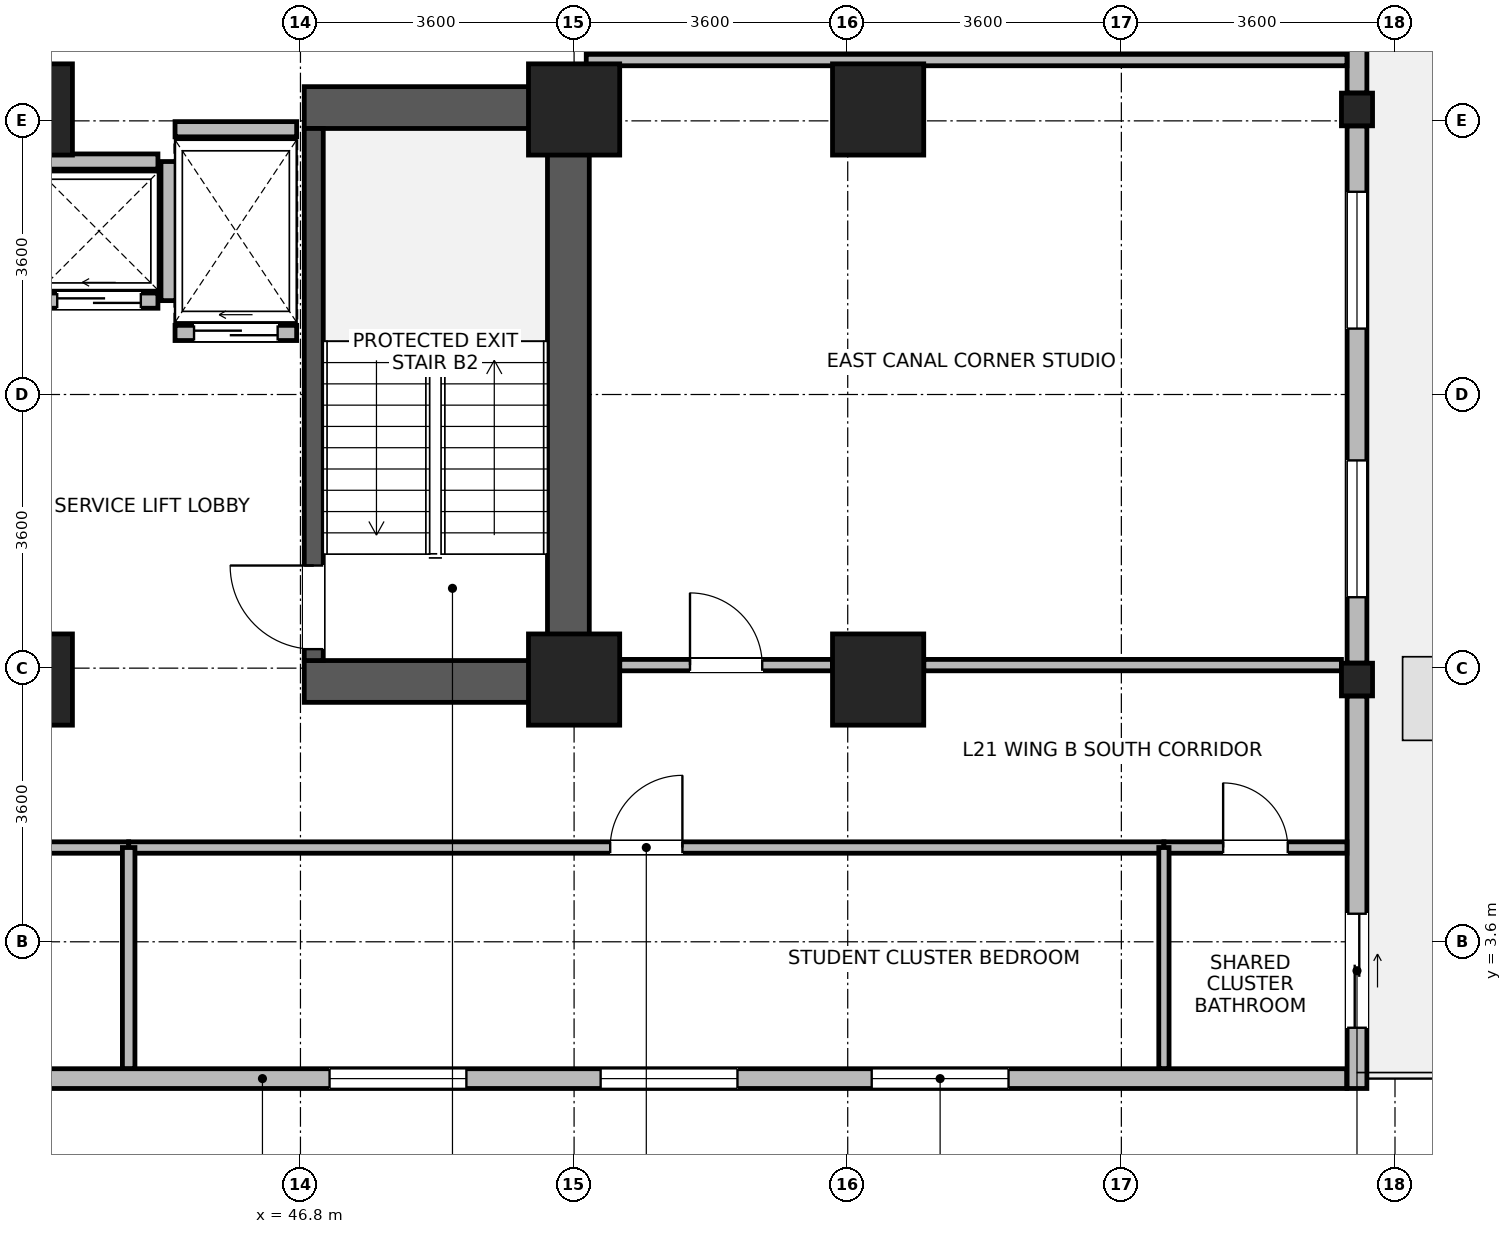
"""IFC4 building model, lengths in metres.
Left out: names, types, materials, properties, quantities, classifications, styles, units other than length and angle.
Written with IfcOpenShell. Run it as: python <this file> out.ifc"""

import sys

from ifc_helpers import new_model, si_unit, direction, frame, frame_2d, origin, origin_2d, place, context, subcontext, project, spatial, rectangle, i_section, extrude, source, transform, mapped, element, fill, save


model = new_model("IFC4")
c1 = context("Model", 3, precision=1e-05, world=origin(), true_north=direction((0.0, 1.0)))
c2 = subcontext(c1, "Body", "Model", "MODEL_VIEW")
j1 = project(units=[si_unit("LENGTHUNIT", "METRE"), si_unit("PLANEANGLEUNIT", "RADIAN")], contexts=[c1])
p1 = place(None, origin())
s1 = spatial("IfcSite", under=j1, at=p1, CompositionType="ELEMENT")
p2 = place(p1, origin())
s2 = spatial("IfcBuilding", under=s1, at=p2, CompositionType="ELEMENT")
p3 = place(p2, frame((0.0, 0.0, 86.0)))
s3 = spatial("IfcBuildingStorey", under=s2, at=p3, CompositionType="ELEMENT", Elevation=86.0)
p4 = place(p3, frame((50.325, 6.75, 0.0), z_axis=(0.0, 0.0, 1.0), x_axis=(0.0, 1.0, 0.0)))
e1 = element("IfcWall", 1, at=p4, inside=s3, PredefinedType="SHEAR", context=c2, shape_type="SweptSolid", body=[
    extrude(rectangle(XDim=8.1, YDim=0.55, at=frame_2d((4.05, 0.0))), origin(), (0.0, 0.0, 1.0), 3.45),
])
for number, where, z_axis, x_axis in (
    (2, (46.85, 7.025, 0.0), (0.0, 0.0, 1.0), (1.0, 0.0, 0.0)),
    (3, (46.85, 14.575, 0.0), (0.0, 0.0, 1.0), (1.0, 0.0, 0.0)),
):
    element("IfcWall", number, at=place(p3, frame(where, z_axis=z_axis, x_axis=x_axis)), inside=s3, PredefinedType="SHEAR", context=c2, shape_type="SweptSolid", body=[
        extrude(rectangle(XDim=3.2, YDim=0.55, at=frame_2d((1.6, 0.0))), origin(), (0.0, 0.0, 1.0), 3.45),
    ])
p5 = place(p3, frame((46.975, 7.3, 0.0), z_axis=(0.0, 0.0, 1.0), x_axis=(0.0, 1.0, 0.0)))
e4 = element("IfcWall", 4, at=p5, inside=s3, PredefinedType="SHEAR", context=c2, shape_type="SweptSolid", body=[
    extrude(rectangle(XDim=7.0, YDim=0.25, at=frame_2d((3.5, 0.0))), origin(), (0.0, 0.0, 1.0), 3.45),
])
p6 = place(p5, frame((0.15, 0.0, 0.0)))
e5 = element("IfcOpeningElement", 5, at=p6, cuts=e4, PredefinedType="OPENING", context=c2, shape_type="SweptSolid", body=[
    extrude(rectangle(XDim=1.1, YDim=2.08, at=frame_2d((0.55, 1.04))), frame((0.0, 0.135, 0.0), z_axis=(0.0, -1.0, 0.0), x_axis=(1.0, 0.0, 0.0)), (0.0, 0.0, 1.0), 0.27),
])
m1 = source(origin(), c2, "Body", "SweptSolid", [
    extrude(rectangle(XDim=1.2, YDim=1.2, at=origin_2d()), origin(), (0.0, 0.0, 1.0), 3.7),
])
for number, where, z_axis, x_axis in (
    (6, (43.2, 7.05, 0.0), (0.0, 0.0, 1.0), (1.0, 0.0, 0.0)),
    (7, (43.2, 14.55, 0.0), (0.0, 0.0, 1.0), (1.0, 0.0, 0.0)),
    (8, (50.4, 7.05, 0.0), (0.0, 0.0, 1.0), (1.0, 0.0, 0.0)),
    (9, (50.4, 14.55, 0.0), (0.0, 0.0, 1.0), (1.0, 0.0, 0.0)),
    (10, (54.4, 7.05, 0.0), (0.0, 0.0, 1.0), (1.0, 0.0, 0.0)),
    (11, (54.4, 14.55, 0.0), (0.0, 0.0, 1.0), (1.0, 0.0, 0.0)),
):
    element("IfcColumn", number, at=place(p3, frame(where, z_axis=z_axis, x_axis=x_axis)), inside=s3, PredefinedType="COLUMN", context=c2, shape_type="MappedRepresentation", body=[
        mapped(m1, transform((0.0, 0.0, 0.0), x_axis=(1.0, 0.0, 0.0), y_axis=(0.0, 1.0, 0.0), z_axis=(0.0, 0.0, 1.0), scale=1.0)),
    ])
m2 = source(origin(), c2, "Body", "SweptSolid", [
    extrude(i_section(OverallWidth=0.409, OverallDepth=0.43, WebThickness=0.024, FlangeThickness=0.033, FilletRadius=0.015, at=origin_2d()), origin(), (0.0, 0.0, 1.0), 3.7),
])
for number, where, z_axis, x_axis in (
    (12, (60.7, 7.05, 0.0), (0.0, 0.0, 1.0), (1.0, 0.0, 0.0)),
    (13, (60.7, 14.55, 0.0), (0.0, 0.0, 1.0), (1.0, 0.0, 0.0)),
):
    element("IfcColumn", number, at=place(p3, frame(where, z_axis=z_axis, x_axis=x_axis)), inside=s3, PredefinedType="COLUMN", context=c2, shape_type="MappedRepresentation", body=[
        mapped(m2, transform((0.0, 0.0, 0.0), x_axis=(1.0, 0.0, 0.0), y_axis=(0.0, 1.0, 0.0), z_axis=(0.0, 0.0, 1.0), scale=1.0)),
    ])
p7 = place(p3, frame((60.565, 1.8, 0.0), z_axis=(0.0, 0.0, 1.0), x_axis=(-1.0, 0.0, 0.0)))
e14 = element("IfcWall", 14, at=p7, inside=s3, PredefinedType="STANDARD", context=c2, shape_type="SweptSolid", body=[
    extrude(rectangle(XDim=28.53, YDim=0.26, at=frame_2d((14.265, 0.0))), origin(), (0.0, 0.0, 1.0), 3.43),
])
p8 = place(p7, frame((4.449, 0.0, 0.85)))
e15 = element("IfcOpeningElement", 15, at=p8, cuts=e14, PredefinedType="OPENING", context=c2, shape_type="SweptSolid", body=[
    extrude(rectangle(XDim=1.8, YDim=1.85, at=frame_2d((0.9, 0.925))), frame((0.0, 0.14, 0.0), z_axis=(0.0, -1.0, 0.0), x_axis=(1.0, 0.0, 0.0)), (0.0, 0.0, 1.0), 0.28),
])
p9 = place(p7, frame((8.016, 0.0, 0.85)))
e16 = element("IfcOpeningElement", 16, at=p9, cuts=e14, PredefinedType="OPENING", context=c2, shape_type="SweptSolid", body=[
    extrude(rectangle(XDim=1.8, YDim=1.85, at=frame_2d((0.9, 0.925))), frame((0.0, 0.14, 0.0), z_axis=(0.0, -1.0, 0.0), x_axis=(1.0, 0.0, 0.0)), (0.0, 0.0, 1.0), 0.28),
])
p10 = place(p7, frame((11.582, 0.0, 0.85)))
e17 = element("IfcOpeningElement", 17, at=p10, cuts=e14, PredefinedType="OPENING", context=c2, shape_type="SweptSolid", body=[
    extrude(rectangle(XDim=1.8, YDim=1.85, at=frame_2d((0.9, 0.925))), frame((0.0, 0.14, 0.0), z_axis=(0.0, -1.0, 0.0), x_axis=(1.0, 0.0, 0.0)), (0.0, 0.0, 1.0), 0.28),
])
p11 = place(p7, frame((18.714, 0.0, 0.85)))
e18 = element("IfcOpeningElement", 18, at=p11, cuts=e14, PredefinedType="OPENING", context=c2, shape_type="SweptSolid", body=[
    extrude(rectangle(XDim=1.8, YDim=1.85, at=frame_2d((0.9, 0.925))), frame((0.0, 0.14, 0.0), z_axis=(0.0, -1.0, 0.0), x_axis=(1.0, 0.0, 0.0)), (0.0, 0.0, 1.0), 0.28),
])
p12 = place(p7, frame((22.281, 0.0, 0.85)))
e19 = element("IfcOpeningElement", 19, at=p12, cuts=e14, PredefinedType="OPENING", context=c2, shape_type="SweptSolid", body=[
    extrude(rectangle(XDim=1.8, YDim=1.85, at=frame_2d((0.9, 0.925))), frame((0.0, 0.14, 0.0), z_axis=(0.0, -1.0, 0.0), x_axis=(1.0, 0.0, 0.0)), (0.0, 0.0, 1.0), 0.28),
])
p13 = place(p7, frame((25.847, 0.0, 0.85)))
e20 = element("IfcOpeningElement", 20, at=p13, cuts=e14, PredefinedType="OPENING", context=c2, shape_type="SweptSolid", body=[
    extrude(rectangle(XDim=1.8, YDim=1.85, at=frame_2d((0.9, 0.925))), frame((0.0, 0.14, 0.0), z_axis=(0.0, -1.0, 0.0), x_axis=(1.0, 0.0, 0.0)), (0.0, 0.0, 1.0), 0.28),
])
p14 = place(p3, frame((60.7, 6.834, 0.0), z_axis=(0.0, 0.0, 1.0), x_axis=(0.0, -1.0, 0.0)))
e21 = element("IfcWall", 21, at=p14, inside=s3, PredefinedType="STANDARD", context=c2, shape_type="SweptSolid", body=[
    extrude(rectangle(XDim=5.164, YDim=0.26, at=frame_2d((2.582, 0.0))), origin(), (0.0, 0.0, 1.0), 3.43),
])
p15 = place(p14, frame((2.865, 0.0, 0.0)))
e22 = element("IfcOpeningElement", 22, at=p15, cuts=e21, PredefinedType="OPENING", context=c2, shape_type="SweptSolid", body=[
    extrude(rectangle(XDim=1.5, YDim=2.15, at=frame_2d((0.75, 1.075))), frame((0.0, 0.14, 0.0), z_axis=(0.0, -1.0, 0.0), x_axis=(1.0, 0.0, 0.0)), (0.0, 0.0, 1.0), 0.28),
])
p16 = place(p3, frame((60.7, 14.334, 0.0), z_axis=(0.0, 0.0, 1.0), x_axis=(0.0, -1.0, 0.0)))
e23 = element("IfcWall", 23, at=p16, inside=s3, PredefinedType="STANDARD", context=c2, shape_type="SweptSolid", body=[
    extrude(rectangle(XDim=7.068, YDim=0.26, at=frame_2d((3.534, 0.0))), origin(), (0.0, 0.0, 1.0), 2.93),
])
p17 = place(p16, frame((0.867, 0.0, 0.85)))
e24 = element("IfcOpeningElement", 24, at=p17, cuts=e23, PredefinedType="OPENING", context=c2, shape_type="SweptSolid", body=[
    extrude(rectangle(XDim=1.8, YDim=1.85, at=frame_2d((0.9, 0.925))), frame((0.0, 0.14, 0.0), z_axis=(0.0, -1.0, 0.0), x_axis=(1.0, 0.0, 0.0)), (0.0, 0.0, 1.0), 0.28),
])
p18 = place(p16, frame((4.401, 0.0, 0.85)))
e25 = element("IfcOpeningElement", 25, at=p18, cuts=e23, PredefinedType="OPENING", context=c2, shape_type="SweptSolid", body=[
    extrude(rectangle(XDim=1.8, YDim=1.85, at=frame_2d((0.9, 0.925))), frame((0.0, 0.14, 0.0), z_axis=(0.0, -1.0, 0.0), x_axis=(1.0, 0.0, 0.0)), (0.0, 0.0, 1.0), 0.28),
])
p19 = place(p3, frame((60.7, 21.384, 0.0), z_axis=(0.0, 0.0, 1.0), x_axis=(0.0, -1.0, 0.0)))
e26 = element("IfcWall", 26, at=p19, inside=s3, PredefinedType="STANDARD", context=c2, shape_type="SweptSolid", body=[
    extrude(rectangle(XDim=6.618, YDim=0.26, at=frame_2d((3.309, 0.0))), origin(), (0.0, 0.0, 1.0), 2.93),
])
p20 = place(p19, frame((0.754, 0.0, 0.85)))
e27 = element("IfcOpeningElement", 27, at=p20, cuts=e26, PredefinedType="OPENING", context=c2, shape_type="SweptSolid", body=[
    extrude(rectangle(XDim=1.8, YDim=1.85, at=frame_2d((0.9, 0.925))), frame((0.0, 0.14, 0.0), z_axis=(0.0, -1.0, 0.0), x_axis=(1.0, 0.0, 0.0)), (0.0, 0.0, 1.0), 0.28),
])
p21 = place(p19, frame((4.687, 0.0, 0.85)))
e28 = element("IfcOpeningElement", 28, at=p21, cuts=e26, PredefinedType="OPENING", context=c2, shape_type="SweptSolid", body=[
    extrude(rectangle(XDim=0.95, YDim=1.75, at=frame_2d((0.475, 0.875))), frame((0.0, 0.14, 0.0), z_axis=(0.0, -1.0, 0.0), x_axis=(1.0, 0.0, 0.0)), (0.0, 0.0, 1.0), 0.28),
])
p22 = place(p3, frame((43.375, 12.035, 0.0), z_axis=(0.0, 0.0, 1.0), x_axis=(1.0, 0.0, 0.0)))
e29 = element("IfcWall", 29, at=p22, inside=s3, PredefinedType="PARTITIONING", context=c2, shape_type="SweptSolid", body=[
    extrude(rectangle(XDim=1.55, YDim=0.2, at=frame_2d((0.775, 0.0))), origin(), (0.0, 0.0, 1.0), 3.43),
])
p23 = place(p22, frame((0.225, 0.0, 0.0)))
e30 = element("IfcOpeningElement", 30, at=p23, cuts=e29, PredefinedType="OPENING", context=c2, shape_type="SweptSolid", body=[
    extrude(rectangle(XDim=1.1, YDim=2.12, at=frame_2d((0.55, 1.06))), frame((0.0, 0.11, 0.0), z_axis=(0.0, -1.0, 0.0), x_axis=(1.0, 0.0, 0.0)), (0.0, 0.0, 1.0), 0.22),
])
p24 = place(p3, frame((43.375, 13.865, 0.0), z_axis=(0.0, 0.0, 1.0), x_axis=(1.0, 0.0, 0.0)))
e31 = element("IfcWall", 31, at=p24, inside=s3, PredefinedType="PARTITIONING", context=c2, shape_type="SweptSolid", body=[
    extrude(rectangle(XDim=1.55, YDim=0.2, at=frame_2d((0.775, 0.0))), origin(), (0.0, 0.0, 1.0), 3.43),
])
p25 = place(p3, frame((45.065, 12.035, 0.0), z_axis=(0.0, 0.0, 1.0), x_axis=(0.0, 1.0, 0.0)))
e32 = element("IfcWall", 32, at=p25, inside=s3, PredefinedType="PARTITIONING", context=c2, shape_type="SweptSolid", body=[
    extrude(rectangle(XDim=1.83, YDim=0.2, at=frame_2d((0.915, 0.0))), origin(), (0.0, 0.0, 1.0), 3.43),
])
p26 = place(p3, frame((45.15, 11.61, 0.0), z_axis=(0.0, 0.0, 1.0), x_axis=(1.0, 0.0, 0.0)))
e33 = element("IfcWall", 33, at=p26, inside=s3, PredefinedType="PARTITIONING", context=c2, shape_type="SweptSolid", body=[
    extrude(rectangle(XDim=1.6, YDim=0.2, at=frame_2d((0.8, 0.0))), origin(), (0.0, 0.0, 1.0), 3.43),
])
p27 = place(p26, frame((0.25, 0.0, 0.0)))
e34 = element("IfcOpeningElement", 34, at=p27, cuts=e33, PredefinedType="OPENING", context=c2, shape_type="SweptSolid", body=[
    extrude(rectangle(XDim=1.1, YDim=2.12, at=frame_2d((0.55, 1.06))), frame((0.0, 0.11, 0.0), z_axis=(0.0, -1.0, 0.0), x_axis=(1.0, 0.0, 0.0)), (0.0, 0.0, 1.0), 0.22),
])
p28 = place(p3, frame((45.15, 14.29, 0.0), z_axis=(0.0, 0.0, 1.0), x_axis=(1.0, 0.0, 0.0)))
e35 = element("IfcWall", 35, at=p28, inside=s3, PredefinedType="PARTITIONING", context=c2, shape_type="SweptSolid", body=[
    extrude(rectangle(XDim=1.6, YDim=0.2, at=frame_2d((0.8, 0.0))), origin(), (0.0, 0.0, 1.0), 2.23),
])
p29 = place(p3, frame((44.54, 4.84, 0.0), z_axis=(0.0, 0.0, 1.0), x_axis=(1.0, 0.0, 0.0)))
e36 = element("IfcWall", 36, at=p29, inside=s3, PredefinedType="PARTITIONING", context=c2, shape_type="SweptSolid", body=[
    extrude(rectangle(XDim=13.62, YDim=0.15, at=frame_2d((6.81, 0.0))), origin(), (0.0, 0.0, 1.0), 3.43),
])
p30 = place(p29, frame((6.335, 0.0, 0.0)))
e37 = element("IfcOpeningElement", 37, at=p30, cuts=e36, PredefinedType="OPENING", context=c2, shape_type="SweptSolid", body=[
    extrude(rectangle(XDim=0.95, YDim=2.1, at=frame_2d((0.475, 1.05))), frame((0.0, 0.085, 0.0), z_axis=(0.0, -1.0, 0.0), x_axis=(1.0, 0.0, 0.0)), (0.0, 0.0, 1.0), 0.17),
])
p31 = place(p3, frame((32.032, 4.84, 0.0), z_axis=(0.0, 0.0, 1.0), x_axis=(1.0, 0.0, 0.0)))
e38 = element("IfcWall", 38, at=p31, inside=s3, PredefinedType="PARTITIONING", context=c2, shape_type="SweptSolid", body=[
    extrude(rectangle(XDim=12.508, YDim=0.15, at=frame_2d((6.254, 0.0))), origin(), (0.0, 0.0, 1.0), 3.43),
])
p32 = place(p31, frame((5.779, 0.0, 0.0)))
e39 = element("IfcOpeningElement", 39, at=p32, cuts=e38, PredefinedType="OPENING", context=c2, shape_type="SweptSolid", body=[
    extrude(rectangle(XDim=0.95, YDim=2.1, at=frame_2d((0.475, 1.05))), frame((0.0, 0.085, 0.0), z_axis=(0.0, -1.0, 0.0), x_axis=(1.0, 0.0, 0.0)), (0.0, 0.0, 1.0), 0.17),
])
p33 = place(p3, frame((51.0, 7.24, 0.0), z_axis=(0.0, 0.0, 1.0), x_axis=(1.0, 0.0, 0.0)))
e40 = element("IfcWall", 40, at=p33, inside=s3, PredefinedType="PARTITIONING", context=c2, shape_type="SweptSolid", body=[
    extrude(rectangle(XDim=2.8, YDim=0.15, at=frame_2d((1.4, 0.0))), origin(), (0.0, 0.0, 1.0), 2.78),
])
p34 = place(p33, frame((0.925, 0.0, 0.0)))
e41 = element("IfcOpeningElement", 41, at=p34, cuts=e40, PredefinedType="OPENING", context=c2, shape_type="SweptSolid", body=[
    extrude(rectangle(XDim=0.95, YDim=2.1, at=frame_2d((0.475, 1.05))), frame((0.0, 0.085, 0.0), z_axis=(0.0, -1.0, 0.0), x_axis=(1.0, 0.0, 0.0)), (0.0, 0.0, 1.0), 0.17),
])
p35 = place(p3, frame((55.0, 7.24, 0.0), z_axis=(0.0, 0.0, 1.0), x_axis=(1.0, 0.0, 0.0)))
e42 = element("IfcWall", 42, at=p35, inside=s3, PredefinedType="PARTITIONING", context=c2, shape_type="SweptSolid", body=[
    extrude(rectangle(XDim=5.496, YDim=0.15, at=frame_2d((2.748, 0.0))), origin(), (0.0, 0.0, 1.0), 2.78),
])
p36 = place(p3, frame((50.56, 15.2, 0.0), z_axis=(0.0, 0.0, 1.0), x_axis=(1.0, 0.0, 0.0)))
e43 = element("IfcWall", 43, at=p36, inside=s3, PredefinedType="PARTITIONING", context=c2, shape_type="SweptSolid", body=[
    extrude(rectangle(XDim=10.008, YDim=0.15, at=frame_2d((5.004, 0.0))), origin(), (0.0, 0.0, 1.0), 3.43),
])
p37 = place(p3, frame((58.16, 4.84, 0.0), z_axis=(0.0, 0.0, 1.0), x_axis=(1.0, 0.0, 0.0)))
e44 = element("IfcWall", 44, at=p37, inside=s3, PredefinedType="PARTITIONING", context=c2, shape_type="SweptSolid", body=[
    extrude(rectangle(XDim=2.408, YDim=0.15, at=frame_2d((1.204, 0.0))), origin(), (0.0, 0.0, 1.0), 3.43),
])
p38 = place(p37, frame((0.779, 0.0, 0.0)))
e45 = element("IfcOpeningElement", 45, at=p38, cuts=e44, PredefinedType="OPENING", context=c2, shape_type="SweptSolid", body=[
    extrude(rectangle(XDim=0.85, YDim=2.04, at=frame_2d((0.425, 1.02))), frame((0.0, 0.085, 0.0), z_axis=(0.0, -1.0, 0.0), x_axis=(1.0, 0.0, 0.0)), (0.0, 0.0, 1.0), 0.17),
])
p39 = place(p3, frame((44.54, 1.932, 0.0), z_axis=(0.0, 0.0, 1.0), x_axis=(0.0, 1.0, 0.0)))
e46 = element("IfcWall", 46, at=p39, inside=s3, PredefinedType="PARTITIONING", context=c2, shape_type="SweptSolid", body=[
    extrude(rectangle(XDim=2.908, YDim=0.165, at=frame_2d((1.454, 0.0))), origin(), (0.0, 0.0, 1.0), 3.43),
])
p40 = place(p3, frame((58.16, 1.932, 0.0), z_axis=(0.0, 0.0, 1.0), x_axis=(0.0, 1.0, 0.0)))
e47 = element("IfcWall", 47, at=p40, inside=s3, PredefinedType="PARTITIONING", context=c2, shape_type="SweptSolid", body=[
    extrude(rectangle(XDim=2.908, YDim=0.135, at=frame_2d((1.454, 0.0))), origin(), (0.0, 0.0, 1.0), 3.43),
])
p41 = place(p8, origin())
e48 = element("IfcWindow", 48, at=p41, inside=s3, PartitioningType="SINGLE_PANEL", PredefinedType="WINDOW", context=c2, shape_type="SweptSolid", body=[
    extrude(rectangle(XDim=1.8, YDim=1.85, at=frame_2d((0.9, 0.925))), frame((0.0, 0.03, 0.0), z_axis=(0.0, -1.0, 0.0), x_axis=(1.0, 0.0, 0.0)), (0.0, 0.0, 1.0), 0.06),
])
fill(e15, e48)
p42 = place(p9, origin())
e49 = element("IfcWindow", 49, at=p42, inside=s3, PartitioningType="SINGLE_PANEL", PredefinedType="WINDOW", context=c2, shape_type="SweptSolid", body=[
    extrude(rectangle(XDim=1.8, YDim=1.85, at=frame_2d((0.9, 0.925))), frame((0.0, 0.03, 0.0), z_axis=(0.0, -1.0, 0.0), x_axis=(1.0, 0.0, 0.0)), (0.0, 0.0, 1.0), 0.06),
])
fill(e16, e49)
p43 = place(p10, origin())
e50 = element("IfcWindow", 50, at=p43, inside=s3, PartitioningType="SINGLE_PANEL", PredefinedType="WINDOW", context=c2, shape_type="SweptSolid", body=[
    extrude(rectangle(XDim=1.8, YDim=1.85, at=frame_2d((0.9, 0.925))), frame((0.0, 0.03, 0.0), z_axis=(0.0, -1.0, 0.0), x_axis=(1.0, 0.0, 0.0)), (0.0, 0.0, 1.0), 0.06),
])
fill(e17, e50)
p44 = place(p15, origin())
e51 = element("IfcDoor", 51, at=p44, inside=s3, OperationType="SLIDING_TO_LEFT", PredefinedType="DOOR", context=c2, shape_type="SweptSolid", body=[
    extrude(rectangle(XDim=1.5, YDim=2.15, at=frame_2d((0.75, 1.075))), frame((0.0, 0.025, 0.0), z_axis=(0.0, -1.0, 0.0), x_axis=(1.0, 0.0, 0.0)), (0.0, 0.0, 1.0), 0.05),
])
fill(e22, e51)
p45 = place(p17, origin())
e52 = element("IfcWindow", 52, at=p45, inside=s3, PartitioningType="SINGLE_PANEL", PredefinedType="WINDOW", context=c2, shape_type="SweptSolid", body=[
    extrude(rectangle(XDim=1.8, YDim=1.85, at=frame_2d((0.9, 0.925))), frame((0.0, 0.03, 0.0), z_axis=(0.0, -1.0, 0.0), x_axis=(1.0, 0.0, 0.0)), (0.0, 0.0, 1.0), 0.06),
])
fill(e24, e52)
p46 = place(p18, origin())
e53 = element("IfcWindow", 53, at=p46, inside=s3, PartitioningType="SINGLE_PANEL", PredefinedType="WINDOW", context=c2, shape_type="SweptSolid", body=[
    extrude(rectangle(XDim=1.8, YDim=1.85, at=frame_2d((0.9, 0.925))), frame((0.0, 0.03, 0.0), z_axis=(0.0, -1.0, 0.0), x_axis=(1.0, 0.0, 0.0)), (0.0, 0.0, 1.0), 0.06),
])
fill(e25, e53)
p47 = place(p6, origin())
e54 = element("IfcDoor", 54, at=p47, inside=s3, OperationType="SINGLE_SWING_RIGHT", PredefinedType="DOOR", context=c2, shape_type="SweptSolid", body=[
    extrude(rectangle(XDim=1.1, YDim=2.08, at=frame_2d((0.55, 1.04))), frame((0.0, 0.025, 0.0), z_axis=(0.0, -1.0, 0.0), x_axis=(1.0, 0.0, 0.0)), (0.0, 0.0, 1.0), 0.05),
])
fill(e5, e54)
p48 = place(p23, origin())
e55 = element("IfcDoor", 55, at=p48, inside=s3, OperationType="SLIDING_TO_LEFT", PredefinedType="DOOR", context=c2, shape_type="SweptSolid", body=[
    extrude(rectangle(XDim=1.1, YDim=2.12, at=frame_2d((0.55, 1.06))), frame((0.0, 0.025, 0.0), z_axis=(0.0, -1.0, 0.0), x_axis=(1.0, 0.0, 0.0)), (0.0, 0.0, 1.0), 0.05),
])
fill(e30, e55)
p49 = place(p27, origin())
e56 = element("IfcDoor", 56, at=p49, inside=s3, OperationType="SLIDING_TO_LEFT", PredefinedType="DOOR", context=c2, shape_type="SweptSolid", body=[
    extrude(rectangle(XDim=1.1, YDim=2.12, at=frame_2d((0.55, 1.06))), frame((0.0, 0.025, 0.0), z_axis=(0.0, -1.0, 0.0), x_axis=(1.0, 0.0, 0.0)), (0.0, 0.0, 1.0), 0.05),
])
fill(e34, e56)
p50 = place(p30, origin())
e57 = element("IfcDoor", 57, at=p50, inside=s3, OperationType="SINGLE_SWING_RIGHT", PredefinedType="DOOR", context=c2, shape_type="SweptSolid", body=[
    extrude(rectangle(XDim=0.95, YDim=2.1, at=frame_2d((0.475, 1.05))), frame((0.0, 0.025, 0.0), z_axis=(0.0, -1.0, 0.0), x_axis=(1.0, 0.0, 0.0)), (0.0, 0.0, 1.0), 0.05),
])
fill(e37, e57)
p51 = place(p34, origin())
e58 = element("IfcDoor", 58, at=p51, inside=s3, OperationType="SINGLE_SWING_LEFT", PredefinedType="DOOR", context=c2, shape_type="SweptSolid", body=[
    extrude(rectangle(XDim=0.95, YDim=2.1, at=frame_2d((0.475, 1.05))), frame((0.0, 0.025, 0.0), z_axis=(0.0, -1.0, 0.0), x_axis=(1.0, 0.0, 0.0)), (0.0, 0.0, 1.0), 0.05),
])
fill(e41, e58)
p52 = place(p38, origin())
e59 = element("IfcDoor", 59, at=p52, inside=s3, OperationType="SINGLE_SWING_LEFT", PredefinedType="DOOR", context=c2, shape_type="SweptSolid", body=[
    extrude(rectangle(XDim=0.85, YDim=2.04, at=frame_2d((0.425, 1.02))), frame((0.0, 0.025, 0.0), z_axis=(0.0, -1.0, 0.0), x_axis=(1.0, 0.0, 0.0)), (0.0, 0.0, 1.0), 0.05),
])
fill(e45, e59)
save(model, sys.argv[1])
